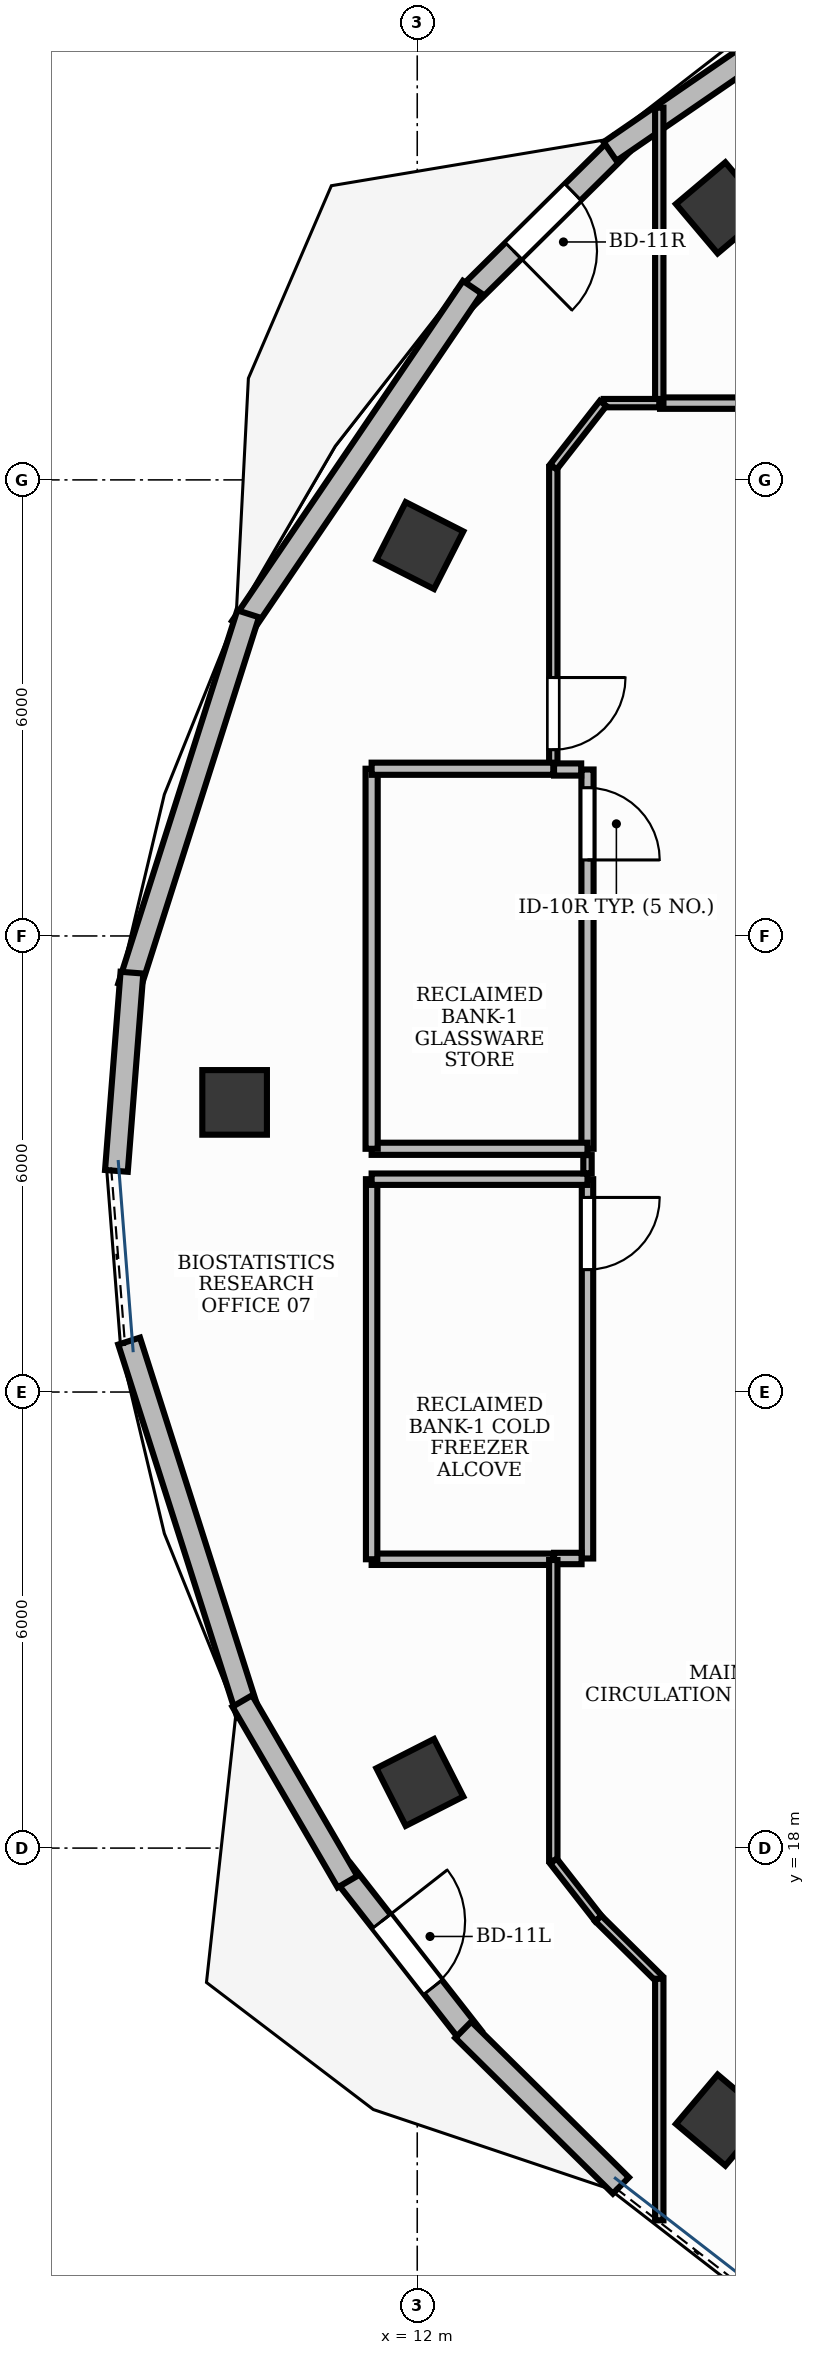
"""IFC4 building model, lengths in metres.
Left out: names, types, materials, properties, quantities, classifications, styles, units other than length and angle.
Written with IfcOpenShell. Run it as: python <this file> out.ifc"""

import sys

from ifc_helpers import new_model, si_unit, direction, frame, frame_2d, origin, origin_2d, place, context, subcontext, project, spatial, rectangle, extrude, element, fill, save


model = new_model("IFC4")
c1 = context("Model", 3, precision=1e-05, world=origin(), true_north=direction((0.0, 1.0)))
c2 = subcontext(c1, "Body", "Model", "MODEL_VIEW")
j1 = project(units=[si_unit("LENGTHUNIT", "METRE"), si_unit("PLANEANGLEUNIT", "RADIAN")], contexts=[c1])
p1 = place(None, origin())
s1 = spatial("IfcSite", under=j1, at=p1, CompositionType="ELEMENT")
p2 = place(p1, origin())
s2 = spatial("IfcBuilding", under=s1, at=p2, CompositionType="ELEMENT")
p3 = place(p2, frame((0.0, 0.0, 268.8)))
s3 = spatial("IfcBuildingStorey", under=s2, at=p3, CompositionType="ELEMENT", Elevation=268.8)
for number, where, z_axis, x_axis in (
    (1, (16.003, 39.579, -0.0), (0.0, 0.0, 1.0), (0.764, 0.645, 0.0)),
    (2, (12.034, 35.136, -0.0), (0.0, 0.0, 1.0), (0.453, 0.891, 0.0)),
    (3, (9.597, 27.81, -0.0), (0.0, 0.0, 1.0), (0.0, 1.0, 0.0)),
    (4, (12.034, 18.864, -0.0), (0.0, 0.0, 1.0), (-0.453, 0.891, 0.0)),
    (5, (16.003, 14.421, -0.0), (0.0, 0.0, 1.0), (-0.764, 0.645, 0.0)),
):
    element("IfcColumn", number, at=place(p3, frame(where, z_axis=z_axis, x_axis=x_axis)), inside=s3, PredefinedType="COLUMN", context=c2, shape_type="SweptSolid", body=[
        extrude(rectangle(XDim=0.85, YDim=0.85, at=origin_2d()), origin(), (0.0, 0.0, 1.0), 3.901),
    ])
p4 = place(p3, frame((14.679, 40.411, 0.0), z_axis=(0.0, 0.0, 1.0), x_axis=(-0.711382793294, -0.702804753403, 0.0)))
e6 = element("IfcWall", 6, at=p4, inside=s3, PredefinedType="STANDARD", context=c2, shape_type="SweptSolid", body=[
    extrude(rectangle(XDim=2.875, YDim=0.3, at=frame_2d((1.437, 0.0))), origin(), (0.0, 0.0, 1.0), 3.9),
])
p5 = place(p4, frame((0.887, 0.0, 0.0)))
e7 = element("IfcOpeningElement", 7, at=p5, cuts=e6, PredefinedType="OPENING", context=c2, shape_type="SweptSolid", body=[
    extrude(rectangle(XDim=1.1, YDim=2.15, at=frame_2d((0.55, 1.075))), frame((0.0, 0.165, 0.0), z_axis=(0.0, -1.0, 0.0), x_axis=(1.0, 0.0, 0.0)), (0.0, 0.0, 1.0), 0.33),
])
p6 = place(p3, frame((11.01, 17.702, 0.0), z_axis=(0.0, 0.0, 1.0), x_axis=(0.615739179758, -0.787950038081, 0.0)))
e8 = element("IfcWall", 8, at=p6, inside=s3, PredefinedType="STANDARD", context=c2, shape_type="SweptSolid", body=[
    extrude(rectangle(XDim=2.789, YDim=0.3, at=frame_2d((1.394, 0.0))), origin(), (0.0, 0.0, 1.0), 3.9),
])
p7 = place(p6, frame((0.844, 0.0, 0.0)))
e9 = element("IfcOpeningElement", 9, at=p7, cuts=e8, PredefinedType="OPENING", context=c2, shape_type="SweptSolid", body=[
    extrude(rectangle(XDim=1.1, YDim=2.15, at=frame_2d((0.55, 1.075))), frame((0.0, 0.165, 0.0), z_axis=(0.0, -1.0, 0.0), x_axis=(1.0, 0.0, 0.0)), (0.0, 0.0, 1.0), 0.33),
])
p8 = place(p3, frame((19.419, 43.675, 0.0), z_axis=(0.0, 0.0, 1.0), x_axis=(-0.824290809052, -0.566166638113, 0.0)))
e10 = element("IfcWall", 10, at=p8, inside=s3, PredefinedType="STANDARD", context=c2, shape_type="SweptSolid", body=[
    extrude(rectangle(XDim=5.923, YDim=0.3, at=frame_2d((2.961, 0.0))), origin(), (0.0, 0.0, 1.0), 3.9),
])
p9 = place(p3, frame((12.725, 38.534, 0.0), z_axis=(0.0, 0.0, 1.0), x_axis=(-0.561547791281, -0.827444305139, 0.0)))
e11 = element("IfcWall", 11, at=p9, inside=s3, PredefinedType="STANDARD", context=c2, shape_type="SweptSolid", body=[
    extrude(rectangle(XDim=5.407, YDim=0.3, at=frame_2d((2.704, 0.0))), origin(), (0.0, 0.0, 1.0), 3.47),
])
p10 = place(p3, frame((9.775, 34.238, 0.0), z_axis=(0.0, 0.0, 1.0), x_axis=(-0.303876387353, -0.952711467974, 0.0)))
e12 = element("IfcWall", 12, at=p10, inside=s3, PredefinedType="STANDARD", context=c2, shape_type="SweptSolid", body=[
    extrude(rectangle(XDim=5.152, YDim=0.3, at=frame_2d((2.576, 0.0))), origin(), (0.0, 0.0, 1.0), 3.47),
])
p11 = place(p3, frame((8.247, 29.517, 0.0), z_axis=(0.0, 0.0, 1.0), x_axis=(-0.078109406708, -0.996944793147, 0.0)))
e13 = element("IfcWall", 13, at=p11, inside=s3, PredefinedType="STANDARD", context=c2, shape_type="SweptSolid", body=[
    extrude(rectangle(XDim=2.616, YDim=0.3, at=frame_2d((1.308, 0.0))), origin(), (0.0, 0.0, 1.0), 3.47),
])
p12 = place(p3, frame((8.21, 24.67, 0.0), z_axis=(0.0, 0.0, 1.0), x_axis=(0.303876387353, -0.952711467974, 0.0)))
e14 = element("IfcWall", 14, at=p12, inside=s3, PredefinedType="STANDARD", context=c2, shape_type="SweptSolid", body=[
    extrude(rectangle(XDim=5.152, YDim=0.3, at=frame_2d((2.576, 0.0))), origin(), (0.0, 0.0, 1.0), 3.9),
])
p13 = place(p3, frame((9.698, 19.935, 0.0), z_axis=(0.0, 0.0, 1.0), x_axis=(0.503081648792, -0.864238887489, 0.0)))
e15 = element("IfcWall", 15, at=p13, inside=s3, PredefinedType="STANDARD", context=c2, shape_type="SweptSolid", body=[
    extrude(rectangle(XDim=2.751, YDim=0.3, at=frame_2d((1.375, 0.0))), origin(), (0.0, 0.0, 1.0), 3.9),
])
p14 = place(p3, frame((12.606, 15.61, 0.0), z_axis=(0.0, 0.0, 1.0), x_axis=(0.711366092533, -0.702821657602, 0.0)))
e16 = element("IfcWall", 16, at=p14, inside=s3, PredefinedType="STANDARD", context=c2, shape_type="SweptSolid", body=[
    extrude(rectangle(XDim=2.915, YDim=0.3, at=frame_2d((1.457, 0.0))), origin(), (0.0, 0.0, 1.0), 3.9),
])
p15 = place(p3, frame((14.24, 26.8, 0.0), z_axis=(0.0, 0.0, 1.0), x_axis=(0.0, -1.0, 0.0)))
e17 = element("IfcWall", 17, at=p15, inside=s3, PredefinedType="PARTITIONING", context=c2, shape_type="SweptSolid", body=[
    extrude(rectangle(XDim=4.99, YDim=0.15, at=frame_2d((2.495, 0.0))), origin(), (0.0, 0.0, 1.0), 2.91),
])
p16 = place(p15, frame((0.24, 0.0, 0.0)))
e18 = element("IfcOpeningElement", 18, at=p16, cuts=e17, PredefinedType="OPENING", context=c2, shape_type="SweptSolid", body=[
    extrude(rectangle(XDim=0.95, YDim=2.15, at=frame_2d((0.475, 1.075))), frame((0.0, 0.09, 0.0), z_axis=(0.0, -1.0, 0.0), x_axis=(1.0, 0.0, 0.0)), (0.0, 0.0, 1.0), 0.18),
])
p17 = place(p3, frame((14.24, 32.19, 0.0), z_axis=(0.0, 0.0, 1.0), x_axis=(0.0, -1.0, 0.0)))
e19 = element("IfcWall", 19, at=p17, inside=s3, PredefinedType="PARTITIONING", context=c2, shape_type="SweptSolid", body=[
    extrude(rectangle(XDim=4.99, YDim=0.16, at=frame_2d((2.495, 0.0))), origin(), (0.0, 0.0, 1.0), 2.91),
])
p18 = place(p17, frame((0.24, 0.0, 0.0)))
e20 = element("IfcOpeningElement", 20, at=p18, cuts=e19, PredefinedType="OPENING", context=c2, shape_type="SweptSolid", body=[
    extrude(rectangle(XDim=0.95, YDim=2.15, at=frame_2d((0.475, 1.075))), frame((0.0, 0.095, 0.0), z_axis=(0.0, -1.0, 0.0), x_axis=(1.0, 0.0, 0.0)), (0.0, 0.0, 1.0), 0.19),
])
p19 = place(p3, frame((13.79, 36.165, 0.0), z_axis=(0.0, 0.0, 1.0), x_axis=(0.0, -1.0, 0.0)))
e21 = element("IfcWall", 21, at=p19, inside=s3, PredefinedType="MOVABLE", context=c2, shape_type="SweptSolid", body=[
    extrude(rectangle(XDim=3.955, YDim=0.11, at=frame_2d((1.978, 0.0))), origin(), (0.0, 0.0, 1.0), 2.91),
])
p20 = place(p19, frame((2.765, 0.0, 0.0)))
e22 = element("IfcOpeningElement", 22, at=p20, cuts=e21, PredefinedType="OPENING", context=c2, shape_type="SweptSolid", body=[
    extrude(rectangle(XDim=0.95, YDim=2.15, at=frame_2d((0.475, 1.075))), frame((0.0, 0.07, 0.0), z_axis=(0.0, -1.0, 0.0), x_axis=(1.0, 0.0, 0.0)), (0.0, 0.0, 1.0), 0.14),
])
p21 = place(p3, frame((17.6, 37.01, 0.0), z_axis=(0.0, 0.0, 1.0), x_axis=(-1.0, 0.0, 0.0)))
e23 = element("IfcWall", 23, at=p21, inside=s3, PredefinedType="PARTITIONING", context=c2, shape_type="SweptSolid", body=[
    extrude(rectangle(XDim=2.406, YDim=0.15, at=frame_2d((1.203, 0.0))), origin(), (0.0, 0.0, 1.0), 2.91),
])
p22 = place(p21, frame((0.402, 0.0, 0.0)))
e24 = element("IfcOpeningElement", 24, at=p22, cuts=e23, PredefinedType="OPENING", context=c2, shape_type="SweptSolid", body=[
    extrude(rectangle(XDim=0.95, YDim=2.15, at=frame_2d((0.475, 1.075))), frame((0.0, 0.09, 0.0), z_axis=(0.0, -1.0, 0.0), x_axis=(1.0, 0.0, 0.0)), (0.0, 0.0, 1.0), 0.18),
])
p23 = place(p3, frame((14.162, 21.81, 0.0), z_axis=(0.0, 0.0, 1.0), x_axis=(-1.0, 0.0, 0.0)))
e25 = element("IfcWall", 25, at=p23, inside=s3, PredefinedType="PARTITIONING", context=c2, shape_type="SweptSolid", body=[
    extrude(rectangle(XDim=0.362, YDim=0.15, at=frame_2d((0.181, 0.0))), origin(), (0.0, 0.0, 1.0), 2.91),
])
p24 = place(p3, frame((13.79, 21.8, 0.0), z_axis=(0.0, 0.0, 1.0), x_axis=(-1.0, 0.0, 0.0)))
e26 = element("IfcWall", 26, at=p24, inside=s3, PredefinedType="PARTITIONING", context=c2, shape_type="SweptSolid", body=[
    extrude(rectangle(XDim=2.39, YDim=0.15, at=frame_2d((1.195, 0.0))), origin(), (0.0, 0.0, 1.0), 2.91),
])
p25 = place(p3, frame((11.4, 21.8, 0.0), z_axis=(0.0, 0.0, 1.0), x_axis=(0.0, 1.0, 0.0)))
e27 = element("IfcWall", 27, at=p25, inside=s3, PredefinedType="PARTITIONING", context=c2, shape_type="SweptSolid", body=[
    extrude(rectangle(XDim=5.0, YDim=0.15, at=frame_2d((2.5, 0.0))), origin(), (0.0, 0.0, 1.0), 2.91),
])
p26 = place(p3, frame((11.4, 26.8, 0.0), z_axis=(0.0, 0.0, 1.0), x_axis=(1.0, 0.0, 0.0)))
e28 = element("IfcWall", 28, at=p26, inside=s3, PredefinedType="PARTITIONING", context=c2, shape_type="SweptSolid", body=[
    extrude(rectangle(XDim=2.84, YDim=0.15, at=frame_2d((1.42, 0.0))), origin(), (0.0, 0.0, 1.0), 2.91),
])
p27 = place(p3, frame((13.8, 32.19, 0.0), z_axis=(0.0, 0.0, 1.0), x_axis=(1.0, 0.0, 0.0)))
e29 = element("IfcWall", 29, at=p27, inside=s3, PredefinedType="PARTITIONING", context=c2, shape_type="SweptSolid", body=[
    extrude(rectangle(XDim=0.357, YDim=0.16, at=frame_2d((0.178, 0.0))), origin(), (0.0, 0.0, 1.0), 2.91),
])
p28 = place(p3, frame((14.24, 27.2, 0.0), z_axis=(0.0, 0.0, 1.0), x_axis=(-1.0, 0.0, 0.0)))
e30 = element("IfcWall", 30, at=p28, inside=s3, PredefinedType="PARTITIONING", context=c2, shape_type="SweptSolid", body=[
    extrude(rectangle(XDim=2.84, YDim=0.16, at=frame_2d((1.42, 0.0))), origin(), (0.0, 0.0, 1.0), 2.91),
])
p29 = place(p3, frame((11.4, 27.2, 0.0), z_axis=(0.0, 0.0, 1.0), x_axis=(0.0, 1.0, 0.0)))
e31 = element("IfcWall", 31, at=p29, inside=s3, PredefinedType="PARTITIONING", context=c2, shape_type="SweptSolid", body=[
    extrude(rectangle(XDim=5.0, YDim=0.16, at=frame_2d((2.5, 0.0))), origin(), (0.0, 0.0, 1.0), 2.91),
])
p30 = place(p3, frame((11.4, 32.2, 0.0), z_axis=(0.0, 0.0, 1.0), x_axis=(1.0, 0.0, 0.0)))
e32 = element("IfcWall", 32, at=p30, inside=s3, PredefinedType="PARTITIONING", context=c2, shape_type="SweptSolid", body=[
    extrude(rectangle(XDim=2.39, YDim=0.16, at=frame_2d((1.195, 0.0))), origin(), (0.0, 0.0, 1.0), 2.91),
])
p31 = place(p3, frame((16.193, 12.251, 0.0), z_axis=(0.0, 0.0, 1.0), x_axis=(0.687683096997, 0.726010990347, 0.0)))
e33 = element("IfcWall", 33, at=p31, inside=s3, PredefinedType="MOVABLE", context=c2, shape_type="SweptSolid", body=[
    extrude(rectangle(XDim=2.42, YDim=0.11, at=frame_2d((1.21, 0.0))), origin(), (0.0, 0.0, 1.0), 2.91),
])
p32 = place(p3, frame((15.184, 40.897, 0.0), z_axis=(0.0, 0.0, 1.0), x_axis=(0.0, -1.0, 0.0)))
e34 = element("IfcWall", 34, at=p32, inside=s3, PredefinedType="MOVABLE", context=c2, shape_type="SweptSolid", body=[
    extrude(rectangle(XDim=3.887, YDim=0.11, at=frame_2d((1.943, 0.0))), origin(), (0.0, 0.0, 1.0), 2.91),
])
p33 = place(p3, frame((15.184, 37.01, 0.0), z_axis=(0.0, 0.0, 1.0), x_axis=(-1.0, 0.0, 0.0)))
e35 = element("IfcWall", 35, at=p33, inside=s3, PredefinedType="MOVABLE", context=c2, shape_type="SweptSolid", body=[
    extrude(rectangle(XDim=0.732, YDim=0.11, at=frame_2d((0.366, 0.0))), origin(), (0.0, 0.0, 1.0), 2.91),
])
p34 = place(p3, frame((14.445, 37.006, 0.0), z_axis=(0.0, 0.0, 1.0), x_axis=(-0.615836200745, -0.787874211948, 0.0)))
e36 = element("IfcWall", 36, at=p34, inside=s3, PredefinedType="MOVABLE", context=c2, shape_type="SweptSolid", body=[
    extrude(rectangle(XDim=1.06, YDim=0.11, at=frame_2d((0.53, 0.0))), origin(), (0.0, 0.0, 1.0), 2.91),
])
p35 = place(p3, frame((14.24, 27.117, 0.0), z_axis=(0.0, 0.0, 1.0), x_axis=(0.0, -1.0, 0.0)))
e37 = element("IfcWall", 37, at=p35, inside=s3, PredefinedType="MOVABLE", context=c2, shape_type="SweptSolid", body=[
    extrude(rectangle(XDim=0.239, YDim=0.11, at=frame_2d((0.12, 0.0))), origin(), (0.0, 0.0, 1.0), 2.91),
])
p36 = place(p3, frame((13.79, 21.79, 0.0), z_axis=(0.0, 0.0, 1.0), x_axis=(0.0, -1.0, 0.0)))
e38 = element("IfcWall", 38, at=p36, inside=s3, PredefinedType="MOVABLE", context=c2, shape_type="SweptSolid", body=[
    extrude(rectangle(XDim=3.955, YDim=0.11, at=frame_2d((1.978, 0.0))), origin(), (0.0, 0.0, 1.0), 2.91),
])
p37 = place(p3, frame((13.792, 17.829, 0.0), z_axis=(0.0, 0.0, 1.0), x_axis=(0.615841557122, -0.787870025145, 0.0)))
e39 = element("IfcWall", 39, at=p37, inside=s3, PredefinedType="MOVABLE", context=c2, shape_type="SweptSolid", body=[
    extrude(rectangle(XDim=0.959, YDim=0.11, at=frame_2d((0.48, 0.0))), origin(), (0.0, 0.0, 1.0), 2.91),
])
p38 = place(p3, frame((14.384, 17.073, 0.0), z_axis=(0.0, 0.0, 1.0), x_axis=(0.711323037654, -0.702865233243, 0.0)))
e40 = element("IfcWall", 40, at=p38, inside=s3, PredefinedType="MOVABLE", context=c2, shape_type="SweptSolid", body=[
    extrude(rectangle(XDim=1.126, YDim=0.11, at=frame_2d((0.563, 0.0))), origin(), (0.0, 0.0, 1.0), 2.91),
])
p39 = place(p3, frame((15.184, 16.281, 0.0), z_axis=(0.0, 0.0, 1.0), x_axis=(0.0, -1.0, 0.0)))
e41 = element("IfcWall", 41, at=p39, inside=s3, PredefinedType="MOVABLE", context=c2, shape_type="SweptSolid", body=[
    extrude(rectangle(XDim=3.178, YDim=0.11, at=frame_2d((1.589, 0.0))), origin(), (0.0, 0.0, 1.0), 2.91),
])
p40 = place(p5, origin())
e42 = element("IfcDoor", 42, at=p40, inside=s3, OperationType="SINGLE_SWING_RIGHT", PredefinedType="DOOR", context=c2, shape_type="SweptSolid", body=[
    extrude(rectangle(XDim=1.1, YDim=2.15, at=frame_2d((0.55, 1.075))), frame((0.0, 0.025, 0.0), z_axis=(0.0, -1.0, 0.0), x_axis=(1.0, 0.0, 0.0)), (0.0, 0.0, 1.0), 0.05),
])
fill(e7, e42)
p41 = place(p7, origin())
e43 = element("IfcDoor", 43, at=p41, inside=s3, OperationType="SINGLE_SWING_LEFT", PredefinedType="DOOR", context=c2, shape_type="SweptSolid", body=[
    extrude(rectangle(XDim=1.1, YDim=2.15, at=frame_2d((0.55, 1.075))), frame((0.0, 0.025, 0.0), z_axis=(0.0, -1.0, 0.0), x_axis=(1.0, 0.0, 0.0)), (0.0, 0.0, 1.0), 0.05),
])
fill(e9, e43)
p42 = place(p16, origin())
e44 = element("IfcDoor", 44, at=p42, inside=s3, OperationType="SINGLE_SWING_LEFT", PredefinedType="DOOR", context=c2, shape_type="SweptSolid", body=[
    extrude(rectangle(XDim=0.95, YDim=2.15, at=frame_2d((0.475, 1.075))), frame((0.0, 0.025, 0.0), z_axis=(0.0, -1.0, 0.0), x_axis=(1.0, 0.0, 0.0)), (0.0, 0.0, 1.0), 0.05),
])
fill(e18, e44)
p43 = place(p18, origin())
e45 = element("IfcDoor", 45, at=p43, inside=s3, OperationType="SINGLE_SWING_RIGHT", PredefinedType="DOOR", context=c2, shape_type="SweptSolid", body=[
    extrude(rectangle(XDim=0.95, YDim=2.15, at=frame_2d((0.475, 1.075))), frame((0.0, 0.025, 0.0), z_axis=(0.0, -1.0, 0.0), x_axis=(1.0, 0.0, 0.0)), (0.0, 0.0, 1.0), 0.05),
])
fill(e20, e45)
p44 = place(p20, origin())
e46 = element("IfcDoor", 46, at=p44, inside=s3, OperationType="SINGLE_SWING_LEFT", PredefinedType="DOOR", context=c2, shape_type="SweptSolid", body=[
    extrude(rectangle(XDim=0.95, YDim=2.15, at=frame_2d((0.475, 1.075))), frame((0.0, 0.025, 0.0), z_axis=(0.0, -1.0, 0.0), x_axis=(1.0, 0.0, 0.0)), (0.0, 0.0, 1.0), 0.05),
])
fill(e22, e46)
save(model, sys.argv[1])
